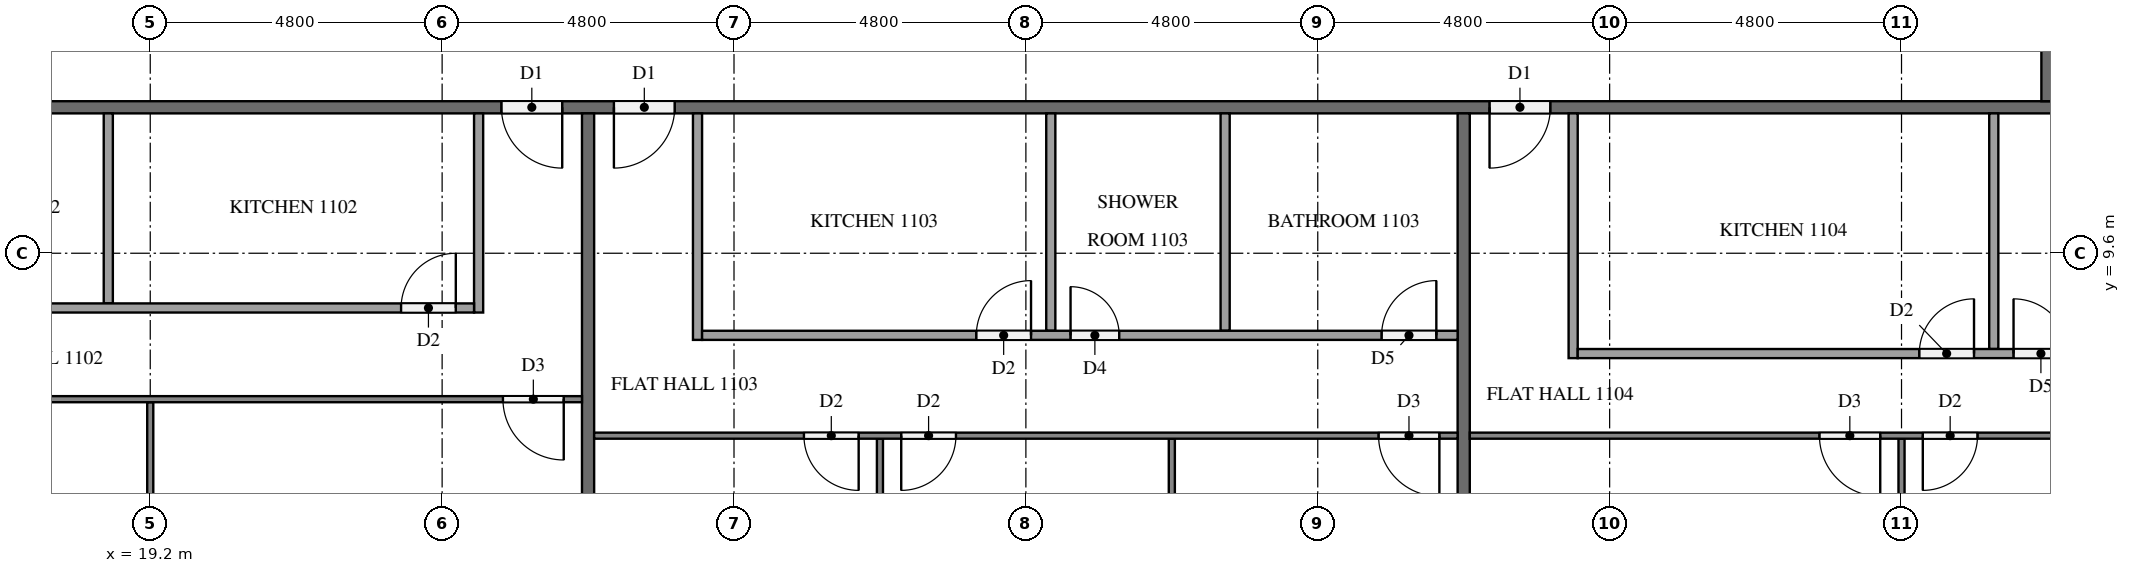
"""IFC4 building model, lengths in metres.
Left out: names, types, materials, properties, quantities, classifications, styles, units other than length and angle.
Written with IfcOpenShell. Run it as: python <this file> out.ifc"""

import sys

from ifc_helpers import new_model, si_unit, direction, frame, frame_2d, origin, place, context, subcontext, project, spatial, rectangle, extrude, element, fill, save


model = new_model("IFC4")
c1 = context("Model", 3, precision=1e-05, world=origin(), true_north=direction((0.0, 1.0)))
c2 = subcontext(c1, "Body", "Model", "MODEL_VIEW")
j1 = project(units=[si_unit("LENGTHUNIT", "METRE"), si_unit("PLANEANGLEUNIT", "RADIAN")], contexts=[c1])
p1 = place(None, origin())
s1 = spatial("IfcSite", under=j1, at=p1, CompositionType="ELEMENT")
p2 = place(p1, origin())
s2 = spatial("IfcBuilding", under=s1, at=p2, CompositionType="ELEMENT")
p3 = place(p2, frame((0.0, 0.0, 46.9)))
s3 = spatial("IfcBuildingStorey", under=s2, at=p3, CompositionType="ELEMENT", Elevation=46.9)
p4 = place(p3, frame((50.5, 12.0, 0.0), z_axis=(0.0, 0.0, 1.0), x_axis=(-1.0, 0.0, 0.0)))
e1 = element("IfcWall", 1, at=p4, inside=s3, PredefinedType="PARTITIONING", context=c2, shape_type="SweptSolid", body=[
    extrude(rectangle(XDim=38.6, YDim=0.2, at=frame_2d((19.3, 0.0))), origin(), (0.0, 0.0, 1.0), 3.2),
])
p5 = place(p4, frame((36.525, 0.0, 0.0)))
e2 = element("IfcOpeningElement", 2, at=p5, cuts=e1, PredefinedType="OPENING", context=c2, shape_type="SweptSolid", body=[
    extrude(rectangle(XDim=1.0, YDim=2.1, at=frame_2d((0.5, 1.05))), frame((0.0, 0.11, 0.0), z_axis=(0.0, -1.0, 0.0), x_axis=(1.0, 0.0, 0.0)), (0.0, 0.0, 1.0), 0.22),
])
p6 = place(p4, frame((24.525, 0.0, 0.0)))
e3 = element("IfcOpeningElement", 3, at=p6, cuts=e1, PredefinedType="OPENING", context=c2, shape_type="SweptSolid", body=[
    extrude(rectangle(XDim=1.0, YDim=2.1, at=frame_2d((0.5, 1.05))), frame((0.0, 0.11, 0.0), z_axis=(0.0, -1.0, 0.0), x_axis=(1.0, 0.0, 0.0)), (0.0, 0.0, 1.0), 0.22),
])
p7 = place(p4, frame((22.675, 0.0, 0.0)))
e4 = element("IfcOpeningElement", 4, at=p7, cuts=e1, PredefinedType="OPENING", context=c2, shape_type="SweptSolid", body=[
    extrude(rectangle(XDim=1.0, YDim=2.1, at=frame_2d((0.5, 1.05))), frame((0.0, 0.11, 0.0), z_axis=(0.0, -1.0, 0.0), x_axis=(1.0, 0.0, 0.0)), (0.0, 0.0, 1.0), 0.22),
])
p8 = place(p4, frame((8.275, 0.0, 0.0)))
e5 = element("IfcOpeningElement", 5, at=p8, cuts=e1, PredefinedType="OPENING", context=c2, shape_type="SweptSolid", body=[
    extrude(rectangle(XDim=1.0, YDim=2.1, at=frame_2d((0.5, 1.05))), frame((0.0, 0.11, 0.0), z_axis=(0.0, -1.0, 0.0), x_axis=(1.0, 0.0, 0.0)), (0.0, 0.0, 1.0), 0.22),
])
p9 = place(p3, frame((50.4, 40.7, 0.0), z_axis=(0.0, 0.0, 1.0), x_axis=(0.0, -1.0, 0.0)))
e6 = element("IfcWall", 6, at=p9, inside=s3, PredefinedType="PARTITIONING", context=c2, shape_type="SweptSolid", body=[
    extrude(rectangle(XDim=28.6, YDim=0.2, at=frame_2d((14.3, 0.0))), origin(), (0.0, 0.0, 1.0), 3.2),
])
p10 = place(p9, frame((17.125, 0.0, 0.0)))
e7 = element("IfcOpeningElement", 7, at=p10, cuts=e6, PredefinedType="OPENING", context=c2, shape_type="SweptSolid", body=[
    extrude(rectangle(XDim=1.0, YDim=2.1, at=frame_2d((0.5, 1.05))), frame((0.0, 0.11, 0.0), z_axis=(0.0, -1.0, 0.0), x_axis=(1.0, 0.0, 0.0)), (0.0, 0.0, 1.0), 0.22),
])
p11 = place(p9, frame((15.275, 0.0, 0.0)))
e8 = element("IfcOpeningElement", 8, at=p11, cuts=e6, PredefinedType="OPENING", context=c2, shape_type="SweptSolid", body=[
    extrude(rectangle(XDim=1.0, YDim=2.1, at=frame_2d((0.5, 1.05))), frame((0.0, 0.11, 0.0), z_axis=(0.0, -1.0, 0.0), x_axis=(1.0, 0.0, 0.0)), (0.0, 0.0, 1.0), 0.22),
])
p12 = place(p9, frame((5.675, 0.0, 0.0)))
e9 = element("IfcOpeningElement", 9, at=p12, cuts=e6, PredefinedType="OPENING", context=c2, shape_type="SweptSolid", body=[
    extrude(rectangle(XDim=1.0, YDim=2.1, at=frame_2d((0.5, 1.05))), frame((0.0, 0.11, 0.0), z_axis=(0.0, -1.0, 0.0), x_axis=(1.0, 0.0, 0.0)), (0.0, 0.0, 1.0), 0.22),
])
for number, where, z_axis, x_axis in (
    (10, (26.4, 11.9, 0.0), (0.0, 0.0, 1.0), (0.0, -1.0, 0.0)),
    (11, (40.8, 11.9, 0.0), (0.0, 0.0, 1.0), (0.0, -1.0, 0.0)),
):
    element("IfcWall", number, at=place(p3, frame(where, z_axis=z_axis, x_axis=x_axis)), inside=s3, PredefinedType="PARTITIONING", context=c2, shape_type="SweptSolid", body=[
        extrude(rectangle(XDim=11.8, YDim=0.2, at=frame_2d((5.9, 0.0))), origin(), (0.0, 0.0, 1.0), 3.2),
    ])
p13 = place(p3, frame((19.2, 7.15, 0.0), z_axis=(0.0, 0.0, 1.0), x_axis=(0.0, -1.0, 0.0)))
e12 = element("IfcWall", 12, at=p13, inside=s3, PredefinedType="PARTITIONING", context=c2, shape_type="SweptSolid", body=[
    extrude(rectangle(XDim=7.05, YDim=0.1, at=frame_2d((3.525, 0.0))), origin(), (0.0, 0.0, 1.0), 3.2),
])
p14 = place(p3, frame((26.3, 7.2, 0.0), z_axis=(0.0, 0.0, 1.0), x_axis=(-1.0, 0.0, 0.0)))
e13 = element("IfcWall", 13, at=p14, inside=s3, PredefinedType="PARTITIONING", context=c2, shape_type="SweptSolid", body=[
    extrude(rectangle(XDim=11.8, YDim=0.1, at=frame_2d((5.9, 0.0))), origin(), (0.0, 0.0, 1.0), 3.2),
])
p15 = place(p14, frame((0.3, 0.0, 0.0)))
e14 = element("IfcOpeningElement", 14, at=p15, cuts=e13, PredefinedType="OPENING", context=c2, shape_type="SweptSolid", body=[
    extrude(rectangle(XDim=1.0, YDim=2.1, at=frame_2d((0.5, 1.05))), frame((0.0, 0.06, 0.0), z_axis=(0.0, -1.0, 0.0), x_axis=(1.0, 0.0, 0.0)), (0.0, 0.0, 1.0), 0.12),
])
p16 = place(p14, frame((10.6, 0.0, 0.0)))
e15 = element("IfcOpeningElement", 15, at=p16, cuts=e13, PredefinedType="OPENING", context=c2, shape_type="SweptSolid", body=[
    extrude(rectangle(XDim=0.9, YDim=2.1, at=frame_2d((0.45, 1.05))), frame((0.0, 0.06, 0.0), z_axis=(0.0, -1.0, 0.0), x_axis=(1.0, 0.0, 0.0)), (0.0, 0.0, 1.0), 0.12),
])
p17 = place(p3, frame((18.51, 11.9, 0.0), z_axis=(0.0, 0.0, 1.0), x_axis=(0.0, -1.0, 0.0)))
e16 = element("IfcWall", 16, at=p17, inside=s3, PredefinedType="PARTITIONING", context=c2, shape_type="SweptSolid", body=[
    extrude(rectangle(XDim=3.125, YDim=0.15, at=frame_2d((1.562, 0.0))), origin(), (0.0, 0.0, 1.0), 3.2),
])
p18 = place(p3, frame((24.6, 11.9, 0.0), z_axis=(0.0, 0.0, 1.0), x_axis=(0.0, -1.0, 0.0)))
e17 = element("IfcWall", 17, at=p18, inside=s3, PredefinedType="PARTITIONING", context=c2, shape_type="SweptSolid", body=[
    extrude(rectangle(XDim=3.275, YDim=0.15, at=frame_2d((1.637, 0.0))), origin(), (0.0, 0.0, 1.0), 3.2),
])
p19 = place(p3, frame((14.5, 8.7, 0.0), z_axis=(0.0, 0.0, 1.0), x_axis=(1.0, 0.0, 0.0)))
e18 = element("IfcWall", 18, at=p19, inside=s3, PredefinedType="PARTITIONING", context=c2, shape_type="SweptSolid", body=[
    extrude(rectangle(XDim=10.025, YDim=0.15, at=frame_2d((5.012, 0.0))), origin(), (0.0, 0.0, 1.0), 3.2),
])
p20 = place(p19, frame((8.825, 0.0, 0.0)))
e19 = element("IfcOpeningElement", 19, at=p20, cuts=e18, PredefinedType="OPENING", context=c2, shape_type="SweptSolid", body=[
    extrude(rectangle(XDim=0.9, YDim=2.1, at=frame_2d((0.45, 1.05))), frame((0.0, 0.085, 0.0), z_axis=(0.0, -1.0, 0.0), x_axis=(1.0, 0.0, 0.0)), (0.0, 0.0, 1.0), 0.17),
])
p21 = place(p19, frame((0.35, 0.0, 0.0)))
e20 = element("IfcOpeningElement", 20, at=p21, cuts=e18, PredefinedType="OPENING", context=c2, shape_type="SweptSolid", body=[
    extrude(rectangle(XDim=0.8, YDim=2.1, at=frame_2d((0.4, 1.05))), frame((0.0, 0.085, 0.0), z_axis=(0.0, -1.0, 0.0), x_axis=(1.0, 0.0, 0.0)), (0.0, 0.0, 1.0), 0.17),
])
for number, where, z_axis, x_axis in (
    (21, (31.2, 6.55, 0.0), (0.0, 0.0, 1.0), (0.0, -1.0, 0.0)),
    (22, (36.0, 6.55, 0.0), (0.0, 0.0, 1.0), (0.0, -1.0, 0.0)),
):
    element("IfcWall", number, at=place(p3, frame(where, z_axis=z_axis, x_axis=x_axis)), inside=s3, PredefinedType="PARTITIONING", context=c2, shape_type="SweptSolid", body=[
        extrude(rectangle(XDim=6.45, YDim=0.1, at=frame_2d((3.225, 0.0))), origin(), (0.0, 0.0, 1.0), 3.2),
    ])
p22 = place(p3, frame((40.7, 6.6, 0.0), z_axis=(0.0, 0.0, 1.0), x_axis=(-1.0, 0.0, 0.0)))
e23 = element("IfcWall", 23, at=p22, inside=s3, PredefinedType="PARTITIONING", context=c2, shape_type="SweptSolid", body=[
    extrude(rectangle(XDim=14.2, YDim=0.1, at=frame_2d((7.1, 0.0))), origin(), (0.0, 0.0, 1.0), 3.2),
])
p23 = place(p22, frame((9.85, 0.0, 0.0)))
e24 = element("IfcOpeningElement", 24, at=p23, cuts=e23, PredefinedType="OPENING", context=c2, shape_type="SweptSolid", body=[
    extrude(rectangle(XDim=0.9, YDim=2.1, at=frame_2d((0.45, 1.05))), frame((0.0, 0.06, 0.0), z_axis=(0.0, -1.0, 0.0), x_axis=(1.0, 0.0, 0.0)), (0.0, 0.0, 1.0), 0.12),
])
p24 = place(p22, frame((8.25, 0.0, 0.0)))
e25 = element("IfcOpeningElement", 25, at=p24, cuts=e23, PredefinedType="OPENING", context=c2, shape_type="SweptSolid", body=[
    extrude(rectangle(XDim=0.9, YDim=2.1, at=frame_2d((0.45, 1.05))), frame((0.0, 0.06, 0.0), z_axis=(0.0, -1.0, 0.0), x_axis=(1.0, 0.0, 0.0)), (0.0, 0.0, 1.0), 0.12),
])
p25 = place(p22, frame((0.3, 0.0, 0.0)))
e26 = element("IfcOpeningElement", 26, at=p25, cuts=e23, PredefinedType="OPENING", context=c2, shape_type="SweptSolid", body=[
    extrude(rectangle(XDim=1.0, YDim=2.1, at=frame_2d((0.5, 1.05))), frame((0.0, 0.06, 0.0), z_axis=(0.0, -1.0, 0.0), x_axis=(1.0, 0.0, 0.0)), (0.0, 0.0, 1.0), 0.12),
])
for number, where, z_axis, x_axis in (
    (27, (34.01, 11.9, 0.0), (0.0, 0.0, 1.0), (0.0, -1.0, 0.0)),
    (28, (36.877, 11.9, 0.0), (0.0, 0.0, 1.0), (0.0, -1.0, 0.0)),
):
    element("IfcWall", number, at=place(p3, frame(where, z_axis=z_axis, x_axis=x_axis)), inside=s3, PredefinedType="PARTITIONING", context=c2, shape_type="SweptSolid", body=[
        extrude(rectangle(XDim=3.575, YDim=0.15, at=frame_2d((1.788, 0.0))), origin(), (0.0, 0.0, 1.0), 3.2),
    ])
p26 = place(p3, frame((28.2, 11.9, 0.0), z_axis=(0.0, 0.0, 1.0), x_axis=(0.0, -1.0, 0.0)))
e29 = element("IfcWall", 29, at=p26, inside=s3, PredefinedType="PARTITIONING", context=c2, shape_type="SweptSolid", body=[
    extrude(rectangle(XDim=3.725, YDim=0.15, at=frame_2d((1.862, 0.0))), origin(), (0.0, 0.0, 1.0), 3.2),
])
p27 = place(p3, frame((28.275, 8.25, 0.0), z_axis=(0.0, 0.0, 1.0), x_axis=(1.0, 0.0, 0.0)))
e30 = element("IfcWall", 30, at=p27, inside=s3, PredefinedType="PARTITIONING", context=c2, shape_type="SweptSolid", body=[
    extrude(rectangle(XDim=12.425, YDim=0.15, at=frame_2d((6.212, 0.0))), origin(), (0.0, 0.0, 1.0), 3.2),
])
p28 = place(p27, frame((4.51, 0.0, 0.0)))
e31 = element("IfcOpeningElement", 31, at=p28, cuts=e30, PredefinedType="OPENING", context=c2, shape_type="SweptSolid", body=[
    extrude(rectangle(XDim=0.9, YDim=2.1, at=frame_2d((0.45, 1.05))), frame((0.0, 0.085, 0.0), z_axis=(0.0, -1.0, 0.0), x_axis=(1.0, 0.0, 0.0)), (0.0, 0.0, 1.0), 0.17),
])
p29 = place(p27, frame((6.06, 0.0, 0.0)))
e32 = element("IfcOpeningElement", 32, at=p29, cuts=e30, PredefinedType="OPENING", context=c2, shape_type="SweptSolid", body=[
    extrude(rectangle(XDim=0.8, YDim=2.1, at=frame_2d((0.4, 1.05))), frame((0.0, 0.085, 0.0), z_axis=(0.0, -1.0, 0.0), x_axis=(1.0, 0.0, 0.0)), (0.0, 0.0, 1.0), 0.17),
])
p30 = place(p27, frame((11.175, 0.0, 0.0)))
e33 = element("IfcOpeningElement", 33, at=p30, cuts=e30, PredefinedType="OPENING", context=c2, shape_type="SweptSolid", body=[
    extrude(rectangle(XDim=0.9, YDim=2.1, at=frame_2d((0.45, 1.05))), frame((0.0, 0.085, 0.0), z_axis=(0.0, -1.0, 0.0), x_axis=(1.0, 0.0, 0.0)), (0.0, 0.0, 1.0), 0.17),
])
p31 = place(p3, frame((48.0, 6.55, 0.0), z_axis=(0.0, 0.0, 1.0), x_axis=(0.0, -1.0, 0.0)))
e34 = element("IfcWall", 34, at=p31, inside=s3, PredefinedType="PARTITIONING", context=c2, shape_type="SweptSolid", body=[
    extrude(rectangle(XDim=6.45, YDim=0.1, at=frame_2d((3.225, 0.0))), origin(), (0.0, 0.0, 1.0), 3.2),
])
p32 = place(p3, frame((57.5, 6.6, 0.0), z_axis=(0.0, 0.0, 1.0), x_axis=(-1.0, 0.0, 0.0)))
e35 = element("IfcWall", 35, at=p32, inside=s3, PredefinedType="PARTITIONING", context=c2, shape_type="SweptSolid", body=[
    extrude(rectangle(XDim=16.6, YDim=0.1, at=frame_2d((8.3, 0.0))), origin(), (0.0, 0.0, 1.0), 3.2),
])
p33 = place(p32, frame((9.85, 0.0, 0.0)))
e36 = element("IfcOpeningElement", 36, at=p33, cuts=e35, PredefinedType="OPENING", context=c2, shape_type="SweptSolid", body=[
    extrude(rectangle(XDim=1.0, YDim=2.1, at=frame_2d((0.5, 1.05))), frame((0.0, 0.06, 0.0), z_axis=(0.0, -1.0, 0.0), x_axis=(1.0, 0.0, 0.0)), (0.0, 0.0, 1.0), 0.12),
])
p34 = place(p32, frame((8.25, 0.0, 0.0)))
e37 = element("IfcOpeningElement", 37, at=p34, cuts=e35, PredefinedType="OPENING", context=c2, shape_type="SweptSolid", body=[
    extrude(rectangle(XDim=0.9, YDim=2.1, at=frame_2d((0.45, 1.05))), frame((0.0, 0.06, 0.0), z_axis=(0.0, -1.0, 0.0), x_axis=(1.0, 0.0, 0.0)), (0.0, 0.0, 1.0), 0.12),
])
p35 = place(p32, frame((0.6, 0.0, 0.0)))
e38 = element("IfcOpeningElement", 38, at=p35, cuts=e35, PredefinedType="OPENING", context=c2, shape_type="SweptSolid", body=[
    extrude(rectangle(XDim=0.9, YDim=2.1, at=frame_2d((0.45, 1.05))), frame((0.0, 0.06, 0.0), z_axis=(0.0, -1.0, 0.0), x_axis=(1.0, 0.0, 0.0)), (0.0, 0.0, 1.0), 0.12),
])
p36 = place(p3, frame((49.517, 11.9, 0.0), z_axis=(0.0, 0.0, 1.0), x_axis=(0.0, -1.0, 0.0)))
e39 = element("IfcWall", 39, at=p36, inside=s3, PredefinedType="PARTITIONING", context=c2, shape_type="SweptSolid", body=[
    extrude(rectangle(XDim=3.875, YDim=0.15, at=frame_2d((1.938, 0.0))), origin(), (0.0, 0.0, 1.0), 3.2),
])
p37 = place(p3, frame((42.6, 11.9, 0.0), z_axis=(0.0, 0.0, 1.0), x_axis=(0.0, -1.0, 0.0)))
e40 = element("IfcWall", 40, at=p37, inside=s3, PredefinedType="PARTITIONING", context=c2, shape_type="SweptSolid", body=[
    extrude(rectangle(XDim=4.025, YDim=0.15, at=frame_2d((2.012, 0.0))), origin(), (0.0, 0.0, 1.0), 3.2),
])
p38 = place(p3, frame((42.675, 7.95, 0.0), z_axis=(0.0, 0.0, 1.0), x_axis=(1.0, 0.0, 0.0)))
e41 = element("IfcWall", 41, at=p38, inside=s3, PredefinedType="PARTITIONING", context=c2, shape_type="SweptSolid", body=[
    extrude(rectangle(XDim=14.825, YDim=0.15, at=frame_2d((7.413, 0.0))), origin(), (0.0, 0.0, 1.0), 3.2),
])
p39 = place(p38, frame((5.617, 0.0, 0.0)))
e42 = element("IfcOpeningElement", 42, at=p39, cuts=e41, PredefinedType="OPENING", context=c2, shape_type="SweptSolid", body=[
    extrude(rectangle(XDim=0.9, YDim=2.1, at=frame_2d((0.45, 1.05))), frame((0.0, 0.085, 0.0), z_axis=(0.0, -1.0, 0.0), x_axis=(1.0, 0.0, 0.0)), (0.0, 0.0, 1.0), 0.17),
])
p40 = place(p38, frame((7.167, 0.0, 0.0)))
e43 = element("IfcOpeningElement", 43, at=p40, cuts=e41, PredefinedType="OPENING", context=c2, shape_type="SweptSolid", body=[
    extrude(rectangle(XDim=0.9, YDim=2.1, at=frame_2d((0.45, 1.05))), frame((0.0, 0.085, 0.0), z_axis=(0.0, -1.0, 0.0), x_axis=(1.0, 0.0, 0.0)), (0.0, 0.0, 1.0), 0.17),
])
p41 = place(p38, frame((13.675, 0.0, 0.0)))
e44 = element("IfcOpeningElement", 44, at=p41, cuts=e41, PredefinedType="OPENING", context=c2, shape_type="SweptSolid", body=[
    extrude(rectangle(XDim=0.8, YDim=2.1, at=frame_2d((0.4, 1.05))), frame((0.0, 0.085, 0.0), z_axis=(0.0, -1.0, 0.0), x_axis=(1.0, 0.0, 0.0)), (0.0, 0.0, 1.0), 0.17),
])
p42 = place(p6, origin())
e45 = element("IfcDoor", 45, at=p42, inside=s3, OperationType="SINGLE_SWING_LEFT", PredefinedType="DOOR", context=c2, shape_type="SweptSolid", body=[
    extrude(rectangle(XDim=1.0, YDim=2.1, at=frame_2d((0.5, 1.05))), frame((0.0, 0.025, 0.0), z_axis=(0.0, -1.0, 0.0), x_axis=(1.0, 0.0, 0.0)), (0.0, 0.0, 1.0), 0.05),
])
fill(e3, e45)
p43 = place(p7, origin())
e46 = element("IfcDoor", 46, at=p43, inside=s3, OperationType="SINGLE_SWING_RIGHT", PredefinedType="DOOR", context=c2, shape_type="SweptSolid", body=[
    extrude(rectangle(XDim=1.0, YDim=2.1, at=frame_2d((0.5, 1.05))), frame((0.0, 0.025, 0.0), z_axis=(0.0, -1.0, 0.0), x_axis=(1.0, 0.0, 0.0)), (0.0, 0.0, 1.0), 0.05),
])
fill(e4, e46)
p44 = place(p8, origin())
e47 = element("IfcDoor", 47, at=p44, inside=s3, OperationType="SINGLE_SWING_RIGHT", PredefinedType="DOOR", context=c2, shape_type="SweptSolid", body=[
    extrude(rectangle(XDim=1.0, YDim=2.1, at=frame_2d((0.5, 1.05))), frame((0.0, 0.025, 0.0), z_axis=(0.0, -1.0, 0.0), x_axis=(1.0, 0.0, 0.0)), (0.0, 0.0, 1.0), 0.05),
])
fill(e5, e47)
p45 = place(p15, origin())
e48 = element("IfcDoor", 48, at=p45, inside=s3, OperationType="SINGLE_SWING_LEFT", PredefinedType="DOOR", context=c2, shape_type="SweptSolid", body=[
    extrude(rectangle(XDim=1.0, YDim=2.1, at=frame_2d((0.5, 1.05))), frame((0.0, 0.025, 0.0), z_axis=(0.0, -1.0, 0.0), x_axis=(1.0, 0.0, 0.0)), (0.0, 0.0, 1.0), 0.05),
])
fill(e14, e48)
p46 = place(p20, origin())
e49 = element("IfcDoor", 49, at=p46, inside=s3, OperationType="SINGLE_SWING_RIGHT", PredefinedType="DOOR", context=c2, shape_type="SweptSolid", body=[
    extrude(rectangle(XDim=0.9, YDim=2.1, at=frame_2d((0.45, 1.05))), frame((0.0, 0.025, 0.0), z_axis=(0.0, -1.0, 0.0), x_axis=(1.0, 0.0, 0.0)), (0.0, 0.0, 1.0), 0.05),
])
fill(e19, e49)
p47 = place(p23, origin())
e50 = element("IfcDoor", 50, at=p47, inside=s3, OperationType="SINGLE_SWING_LEFT", PredefinedType="DOOR", context=c2, shape_type="SweptSolid", body=[
    extrude(rectangle(XDim=0.9, YDim=2.1, at=frame_2d((0.45, 1.05))), frame((0.0, 0.025, 0.0), z_axis=(0.0, -1.0, 0.0), x_axis=(1.0, 0.0, 0.0)), (0.0, 0.0, 1.0), 0.05),
])
fill(e24, e50)
p48 = place(p24, origin())
e51 = element("IfcDoor", 51, at=p48, inside=s3, OperationType="SINGLE_SWING_RIGHT", PredefinedType="DOOR", context=c2, shape_type="SweptSolid", body=[
    extrude(rectangle(XDim=0.9, YDim=2.1, at=frame_2d((0.45, 1.05))), frame((0.0, 0.025, 0.0), z_axis=(0.0, -1.0, 0.0), x_axis=(1.0, 0.0, 0.0)), (0.0, 0.0, 1.0), 0.05),
])
fill(e25, e51)
p49 = place(p25, origin())
e52 = element("IfcDoor", 52, at=p49, inside=s3, OperationType="SINGLE_SWING_LEFT", PredefinedType="DOOR", context=c2, shape_type="SweptSolid", body=[
    extrude(rectangle(XDim=1.0, YDim=2.1, at=frame_2d((0.5, 1.05))), frame((0.0, 0.025, 0.0), z_axis=(0.0, -1.0, 0.0), x_axis=(1.0, 0.0, 0.0)), (0.0, 0.0, 1.0), 0.05),
])
fill(e26, e52)
p50 = place(p28, origin())
e53 = element("IfcDoor", 53, at=p50, inside=s3, OperationType="SINGLE_SWING_RIGHT", PredefinedType="DOOR", context=c2, shape_type="SweptSolid", body=[
    extrude(rectangle(XDim=0.9, YDim=2.1, at=frame_2d((0.45, 1.05))), frame((0.0, 0.025, 0.0), z_axis=(0.0, -1.0, 0.0), x_axis=(1.0, 0.0, 0.0)), (0.0, 0.0, 1.0), 0.05),
])
fill(e31, e53)
p51 = place(p29, origin())
e54 = element("IfcDoor", 54, at=p51, inside=s3, OperationType="SINGLE_SWING_LEFT", PredefinedType="DOOR", context=c2, shape_type="SweptSolid", body=[
    extrude(rectangle(XDim=0.8, YDim=2.1, at=frame_2d((0.4, 1.05))), frame((0.0, 0.025, 0.0), z_axis=(0.0, -1.0, 0.0), x_axis=(1.0, 0.0, 0.0)), (0.0, 0.0, 1.0), 0.05),
])
fill(e32, e54)
p52 = place(p30, origin())
e55 = element("IfcDoor", 55, at=p52, inside=s3, OperationType="SINGLE_SWING_RIGHT", PredefinedType="DOOR", context=c2, shape_type="SweptSolid", body=[
    extrude(rectangle(XDim=0.9, YDim=2.1, at=frame_2d((0.45, 1.05))), frame((0.0, 0.025, 0.0), z_axis=(0.0, -1.0, 0.0), x_axis=(1.0, 0.0, 0.0)), (0.0, 0.0, 1.0), 0.05),
])
fill(e33, e55)
p53 = place(p33, origin())
e56 = element("IfcDoor", 56, at=p53, inside=s3, OperationType="SINGLE_SWING_LEFT", PredefinedType="DOOR", context=c2, shape_type="SweptSolid", body=[
    extrude(rectangle(XDim=1.0, YDim=2.1, at=frame_2d((0.5, 1.05))), frame((0.0, 0.025, 0.0), z_axis=(0.0, -1.0, 0.0), x_axis=(1.0, 0.0, 0.0)), (0.0, 0.0, 1.0), 0.05),
])
fill(e36, e56)
p54 = place(p34, origin())
e57 = element("IfcDoor", 57, at=p54, inside=s3, OperationType="SINGLE_SWING_RIGHT", PredefinedType="DOOR", context=c2, shape_type="SweptSolid", body=[
    extrude(rectangle(XDim=0.9, YDim=2.1, at=frame_2d((0.45, 1.05))), frame((0.0, 0.025, 0.0), z_axis=(0.0, -1.0, 0.0), x_axis=(1.0, 0.0, 0.0)), (0.0, 0.0, 1.0), 0.05),
])
fill(e37, e57)
p55 = place(p39, origin())
e58 = element("IfcDoor", 58, at=p55, inside=s3, OperationType="SINGLE_SWING_RIGHT", PredefinedType="DOOR", context=c2, shape_type="SweptSolid", body=[
    extrude(rectangle(XDim=0.9, YDim=2.1, at=frame_2d((0.45, 1.05))), frame((0.0, 0.025, 0.0), z_axis=(0.0, -1.0, 0.0), x_axis=(1.0, 0.0, 0.0)), (0.0, 0.0, 1.0), 0.05),
])
fill(e42, e58)
p56 = place(p40, origin())
e59 = element("IfcDoor", 59, at=p56, inside=s3, OperationType="SINGLE_SWING_LEFT", PredefinedType="DOOR", context=c2, shape_type="SweptSolid", body=[
    extrude(rectangle(XDim=0.9, YDim=2.1, at=frame_2d((0.45, 1.05))), frame((0.0, 0.025, 0.0), z_axis=(0.0, -1.0, 0.0), x_axis=(1.0, 0.0, 0.0)), (0.0, 0.0, 1.0), 0.05),
])
fill(e43, e59)
save(model, sys.argv[1])
